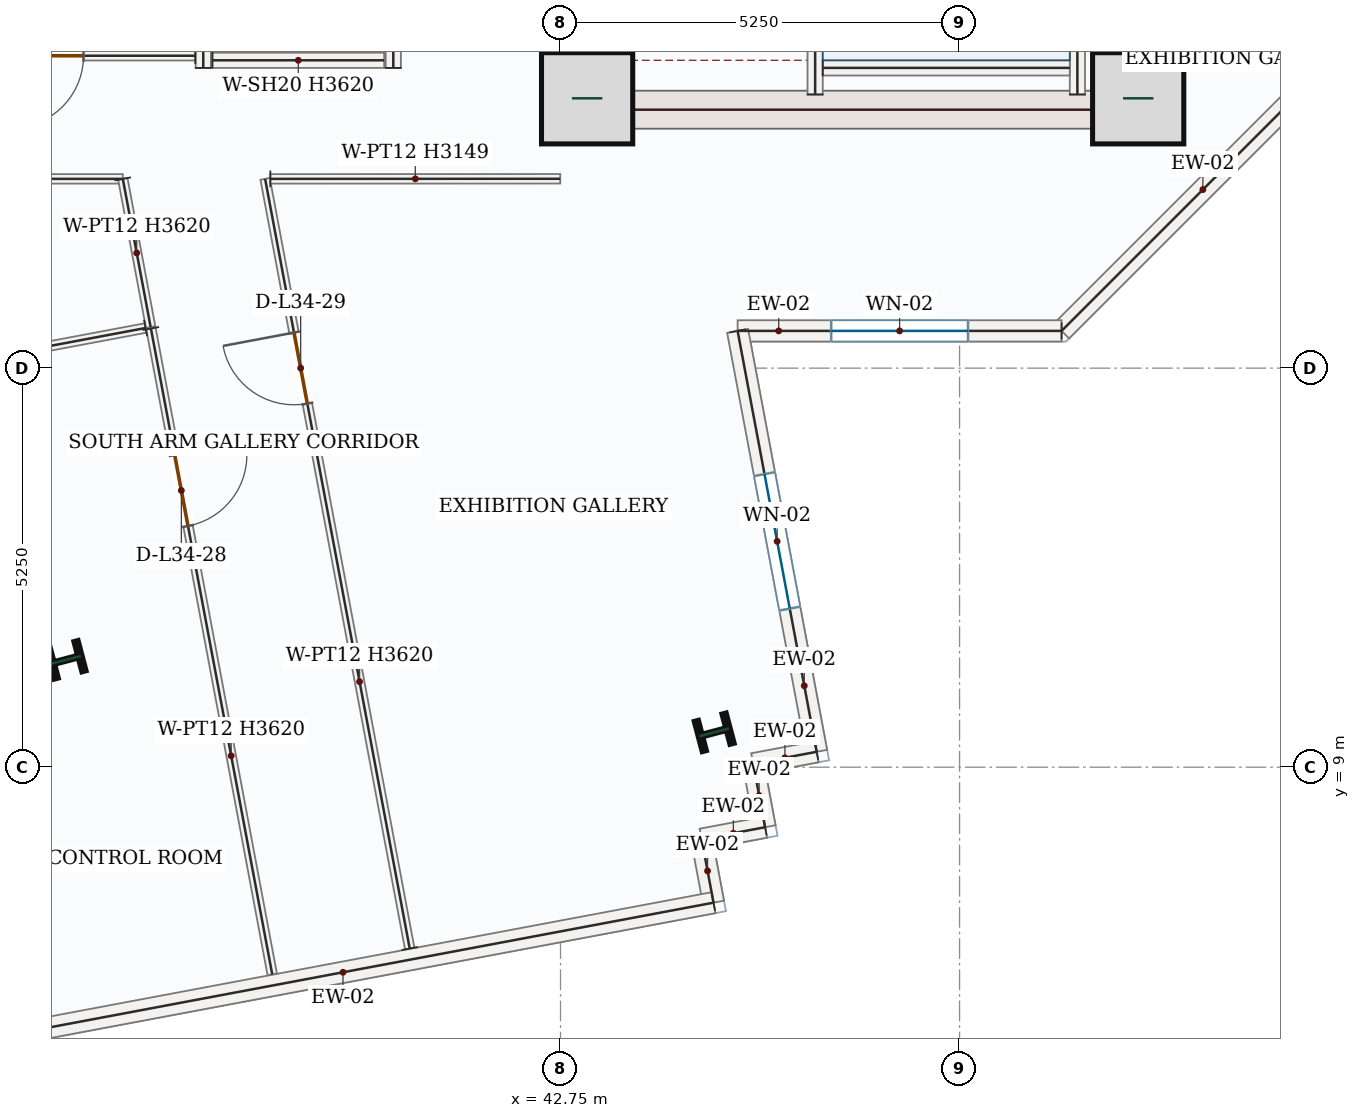
"""IFC4 building model, lengths in metres.
Left out: names, types, materials, properties, quantities, classifications, styles, units other than length and angle.
Written with IfcOpenShell. Run it as: python <this file> out.ifc"""

import sys

from ifc_helpers import new_model, si_unit, direction, frame, frame_2d, origin, origin_2d, place, context, subcontext, project, spatial, rectangle, i_section, extrude, source, transform, mapped, element, fill, save


model = new_model("IFC4")
c1 = context("Model", 3, precision=1e-05, world=origin(), true_north=direction((0.0, 1.0)))
c2 = subcontext(c1, "Body", "Model", "MODEL_VIEW")
j1 = project(units=[si_unit("LENGTHUNIT", "METRE"), si_unit("PLANEANGLEUNIT", "RADIAN")], contexts=[c1])
p1 = place(None, origin())
s1 = spatial("IfcSite", under=j1, at=p1, CompositionType="ELEMENT")
p2 = place(p1, origin())
s2 = spatial("IfcBuilding", under=s1, at=p2, CompositionType="ELEMENT")
p3 = place(p2, frame((0.0, 0.0, 151.2)))
s3 = spatial("IfcBuildingStorey", under=s2, at=p3, CompositionType="ELEMENT", Elevation=151.2)
p4 = place(p3, frame((43.0, 17.4, 0.0), z_axis=(0.0, 0.0, 1.0), x_axis=(0.0, 1.0, 0.0)))
e1 = element("IfcWall", 1, at=p4, inside=s3, PredefinedType="SHEAR", context=c2, shape_type="SweptSolid", body=[
    extrude(rectangle(XDim=8.55, YDim=0.5, at=frame_2d((4.275, 0.0))), origin(), (0.0, 0.0, 1.0), 3.62),
])
p5 = place(p4, frame((6.65, 0.0, 0.0)))
e2 = element("IfcOpeningElement", 2, at=p5, cuts=e1, PredefinedType="OPENING", context=c2, shape_type="SweptSolid", body=[
    extrude(rectangle(XDim=1.1, YDim=2.2, at=frame_2d((0.55, 1.1))), frame((0.0, 0.26, 0.0), z_axis=(0.0, -1.0, 0.0), x_axis=(1.0, 0.0, 0.0)), (0.0, 0.0, 1.0), 0.52),
])
p6 = place(p4, frame((1.75, 0.0, 0.0)))
e3 = element("IfcOpeningElement", 3, at=p6, cuts=e1, PredefinedType="OPENING", context=c2, shape_type="SweptSolid", body=[
    extrude(rectangle(XDim=1.3, YDim=2.2, at=frame_2d((0.65, 1.1))), frame((0.0, 0.26, 0.0), z_axis=(0.0, -1.0, 0.0), x_axis=(1.0, 0.0, 0.0)), (0.0, 0.0, 1.0), 0.52),
])
p7 = place(p4, frame((4.55, 0.0, 0.0)))
e4 = element("IfcOpeningElement", 4, at=p7, cuts=e1, PredefinedType="OPENING", context=c2, shape_type="SweptSolid", body=[
    extrude(rectangle(XDim=0.88, YDim=2.1, at=frame_2d((0.44, 1.05))), frame((0.0, 0.26, 0.0), z_axis=(0.0, -1.0, 0.0), x_axis=(1.0, 0.0, 0.0)), (0.0, 0.0, 1.0), 0.52),
])
m1 = source(origin(), c2, "Body", "SweptSolid", [
    extrude(rectangle(XDim=8.55, YDim=0.5, at=frame_2d((4.275, 0.0))), origin(), (0.0, 0.0, 1.0), 3.62),
])
p8 = place(p3, frame((50.5, 17.4, 0.0), z_axis=(0.0, 0.0, 1.0), x_axis=(0.0, 1.0, 0.0)))
e5 = element("IfcWall", 5, at=p8, inside=s3, PredefinedType="SHEAR", context=c2, shape_type="MappedRepresentation", body=[
    mapped(m1, transform((0.0, 0.0, 0.0), x_axis=(1.0, 0.0, 0.0), y_axis=(0.0, 1.0, 0.0), z_axis=(0.0, 0.0, 1.0), scale=1.0)),
])
m2 = source(origin(), c2, "Body", "SweptSolid", [
    extrude(rectangle(XDim=7.0, YDim=0.5, at=frame_2d((3.5, 0.0))), origin(), (0.0, 0.0, 1.0), 3.62),
])
p9 = place(p3, frame((43.25, 17.65, 0.0), z_axis=(0.0, 0.0, 1.0), x_axis=(1.0, 0.0, 0.0)))
e6 = element("IfcWall", 6, at=p9, inside=s3, PredefinedType="SHEAR", context=c2, shape_type="MappedRepresentation", body=[
    mapped(m2, transform((0.0, 0.0, 0.0), x_axis=(1.0, 0.0, 0.0), y_axis=(0.0, 1.0, 0.0), z_axis=(0.0, 0.0, 1.0), scale=1.0)),
])
m3 = source(origin(), c2, "Body", "SweptSolid", [
    extrude(rectangle(XDim=1.2, YDim=1.2, at=origin_2d()), origin(), (0.0, 0.0, 1.0), 3.9),
])
for number, where, z_axis, x_axis in (
    (7, (43.1, 17.8, 0.0), (0.0, 0.0, 1.0), (1.0, 0.0, 0.0)),
    (8, (50.35, 17.8, 0.0), (0.0, 0.0, 1.0), (1.0, 0.0, 0.0)),
):
    element("IfcColumn", number, at=place(p3, frame(where, z_axis=z_axis, x_axis=x_axis)), inside=s3, PredefinedType="COLUMN", context=c2, shape_type="MappedRepresentation", body=[
        mapped(m3, transform((0.0, 0.0, 0.0), x_axis=(1.0, 0.0, 0.0), y_axis=(0.0, 1.0, 0.0), z_axis=(0.0, 0.0, 1.0), scale=1.0)),
    ])
m4 = source(origin(), c2, "Body", "SweptSolid", [
    extrude(i_section(OverallWidth=0.412, OverallDepth=0.435, WebThickness=0.036, FlangeThickness=0.057, FilletRadius=0.018, at=origin_2d()), origin(), (0.0, 0.0, 1.0), 3.9),
])
for number, where, z_axis, x_axis in (
    (9, (36.245, 10.412, 0.0), (0.0, 0.0, 1.0), (-0.255, 0.967, 0.0)),
    (10, (44.772, 9.459, 0.0), (0.0, 0.0, 1.0), (-0.255, 0.967, 0.0)),
):
    element("IfcColumn", number, at=place(p3, frame(where, z_axis=z_axis, x_axis=x_axis)), inside=s3, PredefinedType="COLUMN", context=c2, shape_type="MappedRepresentation", body=[
        mapped(m4, transform((0.0, 0.0, 0.0), x_axis=(1.0, 0.0, 0.0), y_axis=(0.0, 1.0, 0.0), z_axis=(0.0, 0.0, 1.0), scale=1.0)),
    ])
m5 = source(origin(), c2, "Body", "SweptSolid", [
    extrude(rectangle(XDim=5.258, YDim=0.28, at=frame_2d((2.629, 0.0))), origin(), (0.0, 0.0, 1.0), 3.62),
])
p10 = place(p3, frame((53.06, 18.458, 0.0), z_axis=(0.0, 0.0, 1.0), x_axis=(-0.707106781187, -0.707106781187, 0.0)))
e11 = element("IfcWall", 11, at=p10, inside=s3, PredefinedType="SOLIDWALL", context=c2, shape_type="MappedRepresentation", body=[
    mapped(m5, transform((0.0, 0.0, 0.0), x_axis=(1.0, 0.0, 0.0), y_axis=(0.0, 1.0, 0.0), z_axis=(0.0, 0.0, 1.0), scale=1.0)),
])
p11 = place(p3, frame((49.342, 14.74, 0.0), z_axis=(0.0, 0.0, 1.0), x_axis=(-1.0, 0.0, 0.0)))
e12 = element("IfcWall", 12, at=p11, inside=s3, PredefinedType="SOLIDWALL", context=c2, shape_type="SweptSolid", body=[
    extrude(rectangle(XDim=4.262, YDim=0.28, at=frame_2d((2.131, 0.0))), origin(), (0.0, 0.0, 1.0), 3.62),
])
p12 = place(p11, frame((1.231, 0.0, 0.85)))
e13 = element("IfcOpeningElement", 13, at=p12, cuts=e12, PredefinedType="OPENING", context=c2, shape_type="SweptSolid", body=[
    extrude(rectangle(XDim=1.8, YDim=1.75, at=frame_2d((0.9, 0.875))), frame((0.0, 0.15, 0.0), z_axis=(0.0, -1.0, 0.0), x_axis=(1.0, 0.0, 0.0)), (0.0, 0.0, 1.0), 0.3),
])
p13 = place(p3, frame((45.08, 14.74, 0.0), z_axis=(0.0, 0.0, 1.0), x_axis=(0.184678339457, -0.982799018587, 0.0)))
e14 = element("IfcWall", 14, at=p13, inside=s3, PredefinedType="SOLIDWALL", context=c2, shape_type="SweptSolid", body=[
    extrude(rectangle(XDim=5.634, YDim=0.28, at=frame_2d((2.817, 0.0))), origin(), (0.0, 0.0, 1.0), 3.62),
])
p14 = place(p13, frame((1.917, 0.0, 0.85)))
e15 = element("IfcOpeningElement", 15, at=p14, cuts=e14, PredefinedType="OPENING", context=c2, shape_type="SweptSolid", body=[
    extrude(rectangle(XDim=1.8, YDim=1.75, at=frame_2d((0.9, 0.875))), frame((0.0, 0.15, 0.0), z_axis=(0.0, -1.0, 0.0), x_axis=(1.0, 0.0, 0.0)), (0.0, 0.0, 1.0), 0.3),
])
m6 = source(origin(), c2, "Body", "SweptSolid", [
    extrude(rectangle(XDim=0.85, YDim=0.28, at=frame_2d((0.425, 0.0))), origin(), (0.0, 0.0, 1.0), 3.62),
])
for number, where, z_axis, x_axis in (
    (16, (46.12, 9.203, 0.0), (0.0, 0.0, 1.0), (-0.983, -0.185, 0.0)),
    (17, (45.285, 9.046, 0.0), (0.0, 0.0, 1.0), (0.185, -0.983, 0.0)),
    (18, (45.442, 8.21, 0.0), (0.0, 0.0, 1.0), (-0.983, -0.185, 0.0)),
    (19, (44.606, 8.053, 0.0), (0.0, 0.0, 1.0), (0.185, -0.983, 0.0)),
):
    element("IfcWall", number, at=place(p3, frame(where, z_axis=z_axis, x_axis=x_axis)), inside=s3, PredefinedType="SOLIDWALL", context=c2, shape_type="MappedRepresentation", body=[
        mapped(m6, transform((0.0, 0.0, 0.0), x_axis=(1.0, 0.0, 0.0), y_axis=(0.0, 1.0, 0.0), z_axis=(0.0, 0.0, 1.0), scale=1.0)),
    ])
m7 = source(origin(), c2, "Body", "SweptSolid", [
    extrude(rectangle(XDim=9.92, YDim=0.28, at=frame_2d((4.96, 0.0))), origin(), (0.0, 0.0, 1.0), 3.62),
])
p15 = place(p3, frame((44.763, 7.218, 0.0), z_axis=(0.0, 0.0, 1.0), x_axis=(-0.982807207568, -0.184634754994, 0.0)))
e20 = element("IfcWall", 20, at=p15, inside=s3, PredefinedType="SOLIDWALL", context=c2, shape_type="MappedRepresentation", body=[
    mapped(m7, transform((0.0, 0.0, 0.0), x_axis=(1.0, 0.0, 0.0), y_axis=(0.0, 1.0, 0.0), z_axis=(0.0, 0.0, 1.0), scale=1.0)),
])
m8 = source(origin(), c2, "Body", "SweptSolid", [
    extrude(rectangle(XDim=7.87, YDim=0.2, at=frame_2d((3.935, 0.0))), origin(), (0.0, 0.0, 1.0), 3.62),
])
p16 = place(p3, frame((49.55, 17.85, 0.0), z_axis=(0.0, 0.0, 1.0), x_axis=(0.0, 1.0, 0.0)))
e21 = element("IfcWall", 21, at=p16, inside=s3, PredefinedType="SOLIDWALL", context=c2, shape_type="MappedRepresentation", body=[
    mapped(m8, transform((0.0, 0.0, 0.0), x_axis=(1.0, 0.0, 0.0), y_axis=(0.0, 1.0, 0.0), z_axis=(0.0, 0.0, 1.0), scale=1.0)),
])
p17 = place(p3, frame((46.1, 17.85, 0.0), z_axis=(0.0, 0.0, 1.0), x_axis=(0.0, 1.0, 0.0)))
e22 = element("IfcWall", 22, at=p17, inside=s3, PredefinedType="SOLIDWALL", context=c2, shape_type="SweptSolid", body=[
    extrude(rectangle(XDim=8.0, YDim=0.2, at=frame_2d((4.0, 0.0))), origin(), (0.0, 0.0, 1.0), 3.62),
])
p18 = place(p17, frame((6.3, 0.0, 0.0)))
e23 = element("IfcOpeningElement", 23, at=p18, cuts=e22, PredefinedType="OPENING", context=c2, shape_type="SweptSolid", body=[
    extrude(rectangle(XDim=1.05, YDim=2.15, at=frame_2d((0.525, 1.075))), frame((0.0, 0.11, 0.0), z_axis=(0.0, -1.0, 0.0), x_axis=(1.0, 0.0, 0.0)), (0.0, 0.0, 1.0), 0.22),
])
m9 = source(origin(), c2, "Body", "SweptSolid", [
    extrude(rectangle(XDim=3.25, YDim=0.2, at=frame_2d((1.625, 0.0))), origin(), (0.0, 0.0, 1.0), 3.62),
])
p19 = place(p3, frame((46.2, 18.2, 0.0), z_axis=(0.0, 0.0, 1.0), x_axis=(1.0, 0.0, 0.0)))
e24 = element("IfcWall", 24, at=p19, inside=s3, PredefinedType="SOLIDWALL", context=c2, shape_type="MappedRepresentation", body=[
    mapped(m9, transform((0.0, 0.0, 0.0), x_axis=(1.0, 0.0, 0.0), y_axis=(0.0, 1.0, 0.0), z_axis=(0.0, 0.0, 1.0), scale=1.0)),
])
m10 = source(origin(), c2, "Body", "SweptSolid", [
    extrude(rectangle(XDim=2.35, YDim=0.2, at=frame_2d((1.175, 0.0))), origin(), (0.0, 0.0, 1.0), 3.62),
])
p20 = place(p3, frame((38.05, 18.2, 0.0), z_axis=(0.0, 0.0, 1.0), x_axis=(0.0, 1.0, 0.0)))
e25 = element("IfcWall", 25, at=p20, inside=s3, PredefinedType="SOLIDWALL", context=c2, shape_type="MappedRepresentation", body=[
    mapped(m10, transform((0.0, 0.0, 0.0), x_axis=(1.0, 0.0, 0.0), y_axis=(0.0, 1.0, 0.0), z_axis=(0.0, 0.0, 1.0), scale=1.0)),
])
p21 = place(p3, frame((40.55, 18.2, 0.0), z_axis=(0.0, 0.0, 1.0), x_axis=(0.0, 1.0, 0.0)))
e26 = element("IfcWall", 26, at=p21, inside=s3, PredefinedType="SOLIDWALL", context=c2, shape_type="SweptSolid", body=[
    extrude(rectangle(XDim=2.35, YDim=0.2, at=frame_2d((1.175, 0.0))), origin(), (0.0, 0.0, 1.0), 3.62),
])
p22 = place(p21, frame((0.625, 0.0, 0.0)))
e27 = element("IfcOpeningElement", 27, at=p22, cuts=e26, PredefinedType="OPENING", context=c2, shape_type="SweptSolid", body=[
    extrude(rectangle(XDim=1.1, YDim=2.15, at=frame_2d((0.55, 1.075))), frame((0.0, 0.11, 0.0), z_axis=(0.0, -1.0, 0.0), x_axis=(1.0, 0.0, 0.0)), (0.0, 0.0, 1.0), 0.22),
])
m11 = source(origin(), c2, "Body", "SweptSolid", [
    extrude(rectangle(XDim=2.26, YDim=0.2, at=frame_2d((1.13, 0.0))), origin(), (0.0, 0.0, 1.0), 3.62),
])
p23 = place(p3, frame((38.17, 18.3, 0.0), z_axis=(0.0, 0.0, 1.0), x_axis=(1.0, 0.0, 0.0)))
e28 = element("IfcWall", 28, at=p23, inside=s3, PredefinedType="SOLIDWALL", context=c2, shape_type="MappedRepresentation", body=[
    mapped(m11, transform((0.0, 0.0, 0.0), x_axis=(1.0, 0.0, 0.0), y_axis=(0.0, 1.0, 0.0), z_axis=(0.0, 0.0, 1.0), scale=1.0)),
])
p24 = place(p3, frame((37.945, 18.36, 0.0), z_axis=(0.0, 0.0, 1.0), x_axis=(-1.0, 0.0, 0.0)))
e29 = element("IfcWall", 29, at=p24, inside=s3, PredefinedType="PARTITIONING", context=c2, shape_type="SweptSolid", body=[
    extrude(rectangle(XDim=3.89, YDim=0.125, at=frame_2d((1.945, 0.0))), origin(), (0.0, 0.0, 1.0), 3.62),
])
p25 = place(p24, frame((1.47, 0.0, 0.0)))
e30 = element("IfcOpeningElement", 30, at=p25, cuts=e29, PredefinedType="OPENING", context=c2, shape_type="SweptSolid", body=[
    extrude(rectangle(XDim=0.95, YDim=2.15, at=frame_2d((0.475, 1.075))), frame((0.0, 0.073, 0.0), z_axis=(0.0, -1.0, 0.0), x_axis=(1.0, 0.0, 0.0)), (0.0, 0.0, 1.0), 0.145),
])
p26 = place(p3, frame((29.256, 16.74, 0.0), z_axis=(0.0, 0.0, 1.0), x_axis=(1.0, 0.0, 0.0)))
e31 = element("IfcWall", 31, at=p26, inside=s3, PredefinedType="PARTITIONING", context=c2, shape_type="SweptSolid", body=[
    extrude(rectangle(XDim=7.736, YDim=0.125, at=frame_2d((3.868, 0.0))), origin(), (0.0, 0.0, 1.0), 3.62),
])
p27 = place(p26, frame((5.293, 0.0, 0.0)))
e32 = element("IfcOpeningElement", 32, at=p27, cuts=e31, PredefinedType="OPENING", context=c2, shape_type="SweptSolid", body=[
    extrude(rectangle(XDim=0.95, YDim=2.15, at=frame_2d((0.475, 1.075))), frame((0.0, 0.073, 0.0), z_axis=(0.0, -1.0, 0.0), x_axis=(1.0, 0.0, 0.0)), (0.0, 0.0, 1.0), 0.145),
])
m12 = source(origin(), c2, "Body", "SweptSolid", [
    extrude(rectangle(XDim=1.983, YDim=0.125, at=frame_2d((0.992, 0.0))), origin(), (0.0, 0.0, 1.0), 3.62),
])
p28 = place(p3, frame((36.991, 16.74, 0.0), z_axis=(0.0, 0.0, 1.0), x_axis=(0.184645271511, -0.982805231828, 0.0)))
e33 = element("IfcWall", 33, at=p28, inside=s3, PredefinedType="PARTITIONING", context=c2, shape_type="MappedRepresentation", body=[
    mapped(m12, transform((0.0, 0.0, 0.0), x_axis=(1.0, 0.0, 0.0), y_axis=(0.0, 1.0, 0.0), z_axis=(0.0, 0.0, 1.0), scale=1.0)),
])
m13 = source(origin(), c2, "Body", "SweptSolid", [
    extrude(rectangle(XDim=5.527, YDim=0.125, at=frame_2d((2.764, 0.0))), origin(), (0.0, 0.0, 1.0), 3.62),
])
p29 = place(p3, frame((37.291, 14.778, 0.0), z_axis=(0.0, 0.0, 1.0), x_axis=(-0.982808624954, -0.184627210117, 0.0)))
e34 = element("IfcWall", 34, at=p29, inside=s3, PredefinedType="PARTITIONING", context=c2, shape_type="MappedRepresentation", body=[
    mapped(m13, transform((0.0, 0.0, 0.0), x_axis=(1.0, 0.0, 0.0), y_axis=(0.0, 1.0, 0.0), z_axis=(0.0, 0.0, 1.0), scale=1.0)),
])
p30 = place(p3, frame((37.361, 14.771, 0.0), z_axis=(0.0, 0.0, 1.0), x_axis=(0.18463806937, -0.982806584908, 0.0)))
e35 = element("IfcWall", 35, at=p30, inside=s3, PredefinedType="PARTITIONING", context=c2, shape_type="SweptSolid", body=[
    extrude(rectangle(XDim=8.645, YDim=0.125, at=frame_2d((4.323, 0.0))), origin(), (0.0, 0.0, 1.0), 3.62),
])
p31 = place(p30, frame((1.693, 0.0, 0.0)))
e36 = element("IfcOpeningElement", 36, at=p31, cuts=e35, PredefinedType="OPENING", context=c2, shape_type="SweptSolid", body=[
    extrude(rectangle(XDim=0.95, YDim=2.15, at=frame_2d((0.475, 1.075))), frame((0.0, 0.073, 0.0), z_axis=(0.0, -1.0, 0.0), x_axis=(1.0, 0.0, 0.0)), (0.0, 0.0, 1.0), 0.145),
])
p32 = place(p3, frame((40.766, 6.615, 0.0), z_axis=(0.0, 0.0, 1.0), x_axis=(-0.184646211839, 0.982805055163, 0.0)))
e37 = element("IfcWall", 37, at=p32, inside=s3, PredefinedType="PARTITIONING", context=c2, shape_type="SweptSolid", body=[
    extrude(rectangle(XDim=10.303, YDim=0.125, at=frame_2d((5.151, 0.0))), origin(), (0.0, 0.0, 1.0), 3.62),
])
p33 = place(p32, frame((7.295, 0.0, 0.0)))
e38 = element("IfcOpeningElement", 38, at=p33, cuts=e37, PredefinedType="OPENING", context=c2, shape_type="SweptSolid", body=[
    extrude(rectangle(XDim=0.95, YDim=2.15, at=frame_2d((0.475, 1.075))), frame((0.0, 0.073, 0.0), z_axis=(0.0, -1.0, 0.0), x_axis=(1.0, 0.0, 0.0)), (0.0, 0.0, 1.0), 0.145),
])
m14 = source(origin(), c2, "Body", "SweptSolid", [
    extrude(rectangle(XDim=3.814, YDim=0.125, at=frame_2d((1.907, 0.0))), origin(), (0.0, 0.0, 1.0), 3.149),
])
p34 = place(p3, frame((38.932, 16.74, 0.0), z_axis=(0.0, 0.0, 1.0), x_axis=(0.999999948787, 0.000320040949, 0.0)))
e39 = element("IfcWall", 39, at=p34, inside=s3, PredefinedType="PARTITIONING", context=c2, shape_type="MappedRepresentation", body=[
    mapped(m14, transform((0.0, 0.0, 0.0), x_axis=(1.0, 0.0, 0.0), y_axis=(0.0, 1.0, 0.0), z_axis=(0.0, 0.0, 1.0), scale=1.0)),
])
m15 = source(origin(), c2, "Body", "SweptSolid", [
    extrude(rectangle(XDim=1.8, YDim=1.75, at=frame_2d((0.9, 0.875))), frame((0.0, 0.03, 0.0), z_axis=(0.0, -1.0, 0.0), x_axis=(1.0, 0.0, 0.0)), (0.0, 0.0, 1.0), 0.06),
])
p35 = place(p12, origin())
e40 = element("IfcWindow", 40, at=p35, inside=s3, PartitioningType="DOUBLE_PANEL_VERTICAL", PredefinedType="WINDOW", context=c2, shape_type="MappedRepresentation", body=[
    mapped(m15, transform((0.0, 0.0, 0.0), x_axis=(1.0, 0.0, 0.0), y_axis=(0.0, 1.0, 0.0), z_axis=(0.0, 0.0, 1.0), scale=1.0)),
])
fill(e13, e40)
p36 = place(p14, origin())
e41 = element("IfcWindow", 41, at=p36, inside=s3, PartitioningType="DOUBLE_PANEL_VERTICAL", PredefinedType="WINDOW", context=c2, shape_type="MappedRepresentation", body=[
    mapped(m15, transform((0.0, 0.0, 0.0), x_axis=(1.0, 0.0, 0.0), y_axis=(0.0, 1.0, 0.0), z_axis=(0.0, 0.0, 1.0), scale=1.0)),
])
fill(e15, e41)
m16 = source(origin(), c2, "Body", "SweptSolid", [
    extrude(rectangle(XDim=0.95, YDim=2.15, at=frame_2d((0.475, 1.075))), frame((0.0, 0.025, 0.0), z_axis=(0.0, -1.0, 0.0), x_axis=(1.0, 0.0, 0.0)), (0.0, 0.0, 1.0), 0.05),
])
p37 = place(p25, origin())
e42 = element("IfcDoor", 42, at=p37, inside=s3, OperationType="SINGLE_SWING_RIGHT", PredefinedType="DOOR", context=c2, shape_type="MappedRepresentation", body=[
    mapped(m16, transform((0.0, 0.0, 0.0), x_axis=(1.0, 0.0, 0.0), y_axis=(0.0, 1.0, 0.0), z_axis=(0.0, 0.0, 1.0), scale=1.0)),
])
fill(e30, e42)
p38 = place(p31, origin())
e43 = element("IfcDoor", 43, at=p38, inside=s3, OperationType="SINGLE_SWING_LEFT", PredefinedType="DOOR", context=c2, shape_type="MappedRepresentation", body=[
    mapped(m16, transform((0.0, 0.0, 0.0), x_axis=(1.0, 0.0, 0.0), y_axis=(0.0, 1.0, 0.0), z_axis=(0.0, 0.0, 1.0), scale=1.0)),
])
fill(e36, e43)
p39 = place(p33, origin())
e44 = element("IfcDoor", 44, at=p39, inside=s3, OperationType="SINGLE_SWING_RIGHT", PredefinedType="DOOR", context=c2, shape_type="MappedRepresentation", body=[
    mapped(m16, transform((0.0, 0.0, 0.0), x_axis=(1.0, 0.0, 0.0), y_axis=(0.0, 1.0, 0.0), z_axis=(0.0, 0.0, 1.0), scale=1.0)),
])
fill(e38, e44)
save(model, sys.argv[1])
